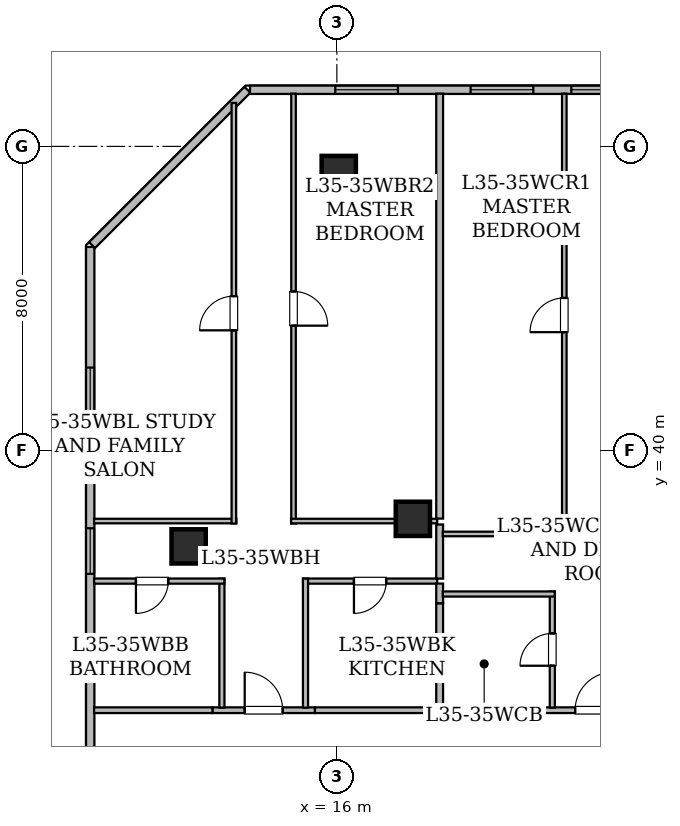
"""IFC4 building model, lengths in metres.
Left out: names, types, materials, properties, quantities, classifications, styles, units other than length and angle.
Written with IfcOpenShell. Run it as: python <this file> out.ifc"""

import sys

from ifc_helpers import new_model, si_unit, direction, frame, frame_2d, origin, origin_2d, place, context, subcontext, project, spatial, rectangle, hollow_rectangle, extrude, element, fill, save


model = new_model("IFC4")
c1 = context("Model", 3, precision=1e-05, world=origin(), true_north=direction((0.0, 1.0)))
c2 = subcontext(c1, "Body", "Model", "MODEL_VIEW")
j1 = project(units=[si_unit("LENGTHUNIT", "METRE"), si_unit("PLANEANGLEUNIT", "RADIAN")], contexts=[c1])
p1 = place(None, origin())
s1 = spatial("IfcSite", under=j1, at=p1, CompositionType="ELEMENT")
p2 = place(p1, origin())
s2 = spatial("IfcBuilding", under=s1, at=p2, CompositionType="ELEMENT")
p3 = place(p2, frame((0.0, 0.0, 138.4)))
s3 = spatial("IfcBuildingStorey", under=s2, at=p3, CompositionType="ELEMENT", Elevation=138.4)
for number, where, z_axis, x_axis in (
    (1, (16.05, 47.3, 0.0), (0.0, 0.0, 1.0), (1.0, 0.0, 0.0)),
    (2, (12.1, 37.475, 0.0), (0.0, 0.0, 1.0), (1.0, 0.0, 0.0)),
    (3, (18.0, 38.2, 0.0), (0.0, 0.0, 1.0), (1.0, 0.0, 0.0)),
):
    element("IfcColumn", number, at=place(p3, frame(where, z_axis=z_axis, x_axis=x_axis)), inside=s3, PredefinedType="COLUMN", context=c2, shape_type="SweptSolid", body=[
        extrude(hollow_rectangle(XDim=0.9, YDim=0.9, WallThickness=0.045, at=origin_2d()), origin(), (0.0, 0.0, 1.0), 3.65),
    ])
p4 = place(p3, frame((9.51, 31.293, 0.0), z_axis=(0.0, 0.0, 1.0), x_axis=(0.0, 1.0, 0.0)))
e4 = element("IfcWall", 4, at=p4, inside=s3, PredefinedType="STANDARD", context=c2, shape_type="SweptSolid", body=[
    extrude(rectangle(XDim=14.061, YDim=0.22, at=frame_2d((7.031, 0.0))), origin(), (0.0, 0.0, 1.0), 3.43),
])
p5 = place(p4, frame((5.459, 0.0, 0.8)))
e5 = element("IfcOpeningElement", 5, at=p5, cuts=e4, PredefinedType="OPENING", context=c2, shape_type="SweptSolid", body=[
    extrude(rectangle(XDim=1.2, YDim=1.5, at=frame_2d((0.6, 0.75))), frame((0.0, 0.12, 0.0), z_axis=(0.0, -1.0, 0.0), x_axis=(1.0, 0.0, 0.0)), (0.0, 0.0, 1.0), 0.24),
])
p6 = place(p4, frame((9.237, 0.0, 0.85)))
e6 = element("IfcOpeningElement", 6, at=p6, cuts=e4, PredefinedType="OPENING", context=c2, shape_type="SweptSolid", body=[
    extrude(rectangle(XDim=1.65, YDim=1.55, at=frame_2d((0.825, 0.775))), frame((0.0, 0.12, 0.0), z_axis=(0.0, -1.0, 0.0), x_axis=(1.0, 0.0, 0.0)), (0.0, 0.0, 1.0), 0.24),
])
p7 = place(p3, frame((9.558, 45.402, 0.0), z_axis=(0.0, 0.0, 1.0), x_axis=(0.707106781187, 0.707106781187, 0.0)))
e7 = element("IfcWall", 7, at=p7, inside=s3, PredefinedType="STANDARD", context=c2, shape_type="SweptSolid", body=[
    extrude(rectangle(XDim=5.781, YDim=0.22, at=frame_2d((2.891, 0.0))), origin(), (0.0, 0.0, 1.0), 3.43),
])
p8 = place(p3, frame((13.715, 49.49, 0.0), z_axis=(0.0, 0.0, 1.0), x_axis=(1.0, 0.0, 0.0)))
e8 = element("IfcWall", 8, at=p8, inside=s3, PredefinedType="STANDARD", context=c2, shape_type="SweptSolid", body=[
    extrude(rectangle(XDim=38.639, YDim=0.22, at=frame_2d((19.319, 0.0))), origin(), (0.0, 0.0, 1.0), 3.43),
])
p9 = place(p8, frame((2.243, 0.0, 0.85)))
e9 = element("IfcOpeningElement", 9, at=p9, cuts=e8, PredefinedType="OPENING", context=c2, shape_type="SweptSolid", body=[
    extrude(rectangle(XDim=1.65, YDim=1.55, at=frame_2d((0.825, 0.775))), frame((0.0, 0.12, 0.0), z_axis=(0.0, -1.0, 0.0), x_axis=(1.0, 0.0, 0.0)), (0.0, 0.0, 1.0), 0.24),
])
p10 = place(p8, frame((8.455, 0.0, 0.8)))
e10 = element("IfcOpeningElement", 10, at=p10, cuts=e8, PredefinedType="OPENING", context=c2, shape_type="SweptSolid", body=[
    extrude(rectangle(XDim=1.2, YDim=1.5, at=frame_2d((0.6, 0.75))), frame((0.0, 0.12, 0.0), z_axis=(0.0, -1.0, 0.0), x_axis=(1.0, 0.0, 0.0)), (0.0, 0.0, 1.0), 0.24),
])
p11 = place(p8, frame((5.805, 0.0, 0.85)))
e11 = element("IfcOpeningElement", 11, at=p11, cuts=e8, PredefinedType="OPENING", context=c2, shape_type="SweptSolid", body=[
    extrude(rectangle(XDim=1.65, YDim=1.55, at=frame_2d((0.825, 0.775))), frame((0.0, 0.12, 0.0), z_axis=(0.0, -1.0, 0.0), x_axis=(1.0, 0.0, 0.0)), (0.0, 0.0, 1.0), 0.24),
])
p12 = place(p8, frame((10.655, 0.0, 0.85)))
e12 = element("IfcOpeningElement", 12, at=p12, cuts=e8, PredefinedType="OPENING", context=c2, shape_type="SweptSolid", body=[
    extrude(rectangle(XDim=1.65, YDim=1.55, at=frame_2d((0.825, 0.775))), frame((0.0, 0.12, 0.0), z_axis=(0.0, -1.0, 0.0), x_axis=(1.0, 0.0, 0.0)), (0.0, 0.0, 1.0), 0.24),
])
p13 = place(p8, frame((16.851, 0.0, 0.85)))
e13 = element("IfcOpeningElement", 13, at=p13, cuts=e8, PredefinedType="OPENING", context=c2, shape_type="SweptSolid", body=[
    extrude(rectangle(XDim=1.65, YDim=1.55, at=frame_2d((0.825, 0.775))), frame((0.0, 0.12, 0.0), z_axis=(0.0, -1.0, 0.0), x_axis=(1.0, 0.0, 0.0)), (0.0, 0.0, 1.0), 0.24),
])
p14 = place(p8, frame((24.116, 0.0, 0.85)))
e14 = element("IfcOpeningElement", 14, at=p14, cuts=e8, PredefinedType="OPENING", context=c2, shape_type="SweptSolid", body=[
    extrude(rectangle(XDim=1.65, YDim=1.55, at=frame_2d((0.825, 0.775))), frame((0.0, 0.12, 0.0), z_axis=(0.0, -1.0, 0.0), x_axis=(1.0, 0.0, 0.0)), (0.0, 0.0, 1.0), 0.24),
])
p15 = place(p8, frame((30.23, 0.0, 0.85)))
e15 = element("IfcOpeningElement", 15, at=p15, cuts=e8, PredefinedType="OPENING", context=c2, shape_type="SweptSolid", body=[
    extrude(rectangle(XDim=1.65, YDim=1.55, at=frame_2d((0.825, 0.775))), frame((0.0, 0.12, 0.0), z_axis=(0.0, -1.0, 0.0), x_axis=(1.0, 0.0, 0.0)), (0.0, 0.0, 1.0), 0.24),
])
p16 = place(p8, frame((36.367, 0.0, 0.85)))
e16 = element("IfcOpeningElement", 16, at=p16, cuts=e8, PredefinedType="OPENING", context=c2, shape_type="SweptSolid", body=[
    extrude(rectangle(XDim=1.65, YDim=1.55, at=frame_2d((0.825, 0.775))), frame((0.0, 0.12, 0.0), z_axis=(0.0, -1.0, 0.0), x_axis=(1.0, 0.0, 0.0)), (0.0, 0.0, 1.0), 0.24),
])
p17 = place(p3, frame((12.726, 33.165, 0.0), z_axis=(0.0, 0.0, 1.0), x_axis=(1.0, 0.0, 0.0)))
e17 = element("IfcWall", 17, at=p17, inside=s3, PredefinedType="STANDARD", context=c2, shape_type="SweptSolid", body=[
    extrude(rectangle(XDim=2.698, YDim=0.15, at=frame_2d((1.349, 0.0))), origin(), (0.0, 0.0, 1.0), 3.43),
])
p18 = place(p17, frame((0.849, 0.0, 0.0)))
e18 = element("IfcOpeningElement", 18, at=p18, cuts=e17, PredefinedType="OPENING", context=c2, shape_type="SweptSolid", body=[
    extrude(rectangle(XDim=1.0, YDim=2.15, at=frame_2d((0.5, 1.075))), frame((0.0, 0.085, 0.0), z_axis=(0.0, -1.0, 0.0), x_axis=(1.0, 0.0, 0.0)), (0.0, 0.0, 1.0), 0.17),
])
p19 = place(p3, frame((9.612, 33.165, 0.0), z_axis=(0.0, 0.0, 1.0), x_axis=(1.0, 0.0, 0.0)))
e19 = element("IfcWall", 19, at=p19, inside=s3, PredefinedType="STANDARD", context=c2, shape_type="SweptSolid", body=[
    extrude(rectangle(XDim=3.114, YDim=0.15, at=frame_2d((1.557, 0.0))), origin(), (0.0, 0.0, 1.0), 2.876),
])
p20 = place(p3, frame((15.424, 33.165, 0.0), z_axis=(0.0, 0.0, 1.0), x_axis=(1.0, 0.0, 0.0)))
e20 = element("IfcWall", 20, at=p20, inside=s3, PredefinedType="STANDARD", context=c2, shape_type="SweptSolid", body=[
    extrude(rectangle(XDim=3.53, YDim=0.15, at=frame_2d((1.765, 0.0))), origin(), (0.0, 0.0, 1.0), 2.647),
])
p21 = place(p3, frame((21.421, 33.165, 0.0), z_axis=(0.0, 0.0, 1.0), x_axis=(1.0, 0.0, 0.0)))
e21 = element("IfcWall", 21, at=p21, inside=s3, PredefinedType="STANDARD", context=c2, shape_type="SweptSolid", body=[
    extrude(rectangle(XDim=2.698, YDim=0.15, at=frame_2d((1.349, 0.0))), origin(), (0.0, 0.0, 1.0), 3.43),
])
p22 = place(p21, frame((0.849, 0.0, 0.0)))
e22 = element("IfcOpeningElement", 22, at=p22, cuts=e21, PredefinedType="OPENING", context=c2, shape_type="SweptSolid", body=[
    extrude(rectangle(XDim=1.0, YDim=2.15, at=frame_2d((0.5, 1.075))), frame((0.0, 0.085, 0.0), z_axis=(0.0, -1.0, 0.0), x_axis=(1.0, 0.0, 0.0)), (0.0, 0.0, 1.0), 0.17),
])
p23 = place(p3, frame((18.954, 33.165, 0.0), z_axis=(0.0, 0.0, 1.0), x_axis=(1.0, 0.0, 0.0)))
e23 = element("IfcWall", 23, at=p23, inside=s3, PredefinedType="STANDARD", context=c2, shape_type="SweptSolid", body=[
    extrude(rectangle(XDim=2.467, YDim=0.15, at=frame_2d((1.233, 0.0))), origin(), (0.0, 0.0, 1.0), 3.43),
])
p24 = place(p3, frame((12.975, 33.232, 0.0), z_axis=(0.0, 0.0, 1.0), x_axis=(0.0, 1.0, 0.0)))
e24 = element("IfcWall", 24, at=p24, inside=s3, PredefinedType="PARTITIONING", context=c2, shape_type="SweptSolid", body=[
    extrude(rectangle(XDim=3.395, YDim=0.135, at=frame_2d((1.698, 0.0))), origin(), (0.0, 0.0, 1.0), 3.43),
])
p25 = place(p3, frame((13.04, 36.562, 0.0), z_axis=(0.0, 0.0, 1.0), x_axis=(-1.0, 0.0, 0.0)))
e25 = element("IfcWall", 25, at=p25, inside=s3, PredefinedType="PARTITIONING", context=c2, shape_type="SweptSolid", body=[
    extrude(rectangle(XDim=3.428, YDim=0.135, at=frame_2d((1.714, 0.0))), origin(), (0.0, 0.0, 1.0), 2.876),
])
p26 = place(p25, frame((1.477, 0.0, 0.0)))
e26 = element("IfcOpeningElement", 26, at=p26, cuts=e25, PredefinedType="OPENING", context=c2, shape_type="SweptSolid", body=[
    extrude(rectangle(XDim=0.85, YDim=2.1, at=frame_2d((0.425, 1.05))), frame((0.0, 0.077, 0.0), z_axis=(0.0, -1.0, 0.0), x_axis=(1.0, 0.0, 0.0)), (0.0, 0.0, 1.0), 0.155),
])
p27 = place(p3, frame((18.64, 36.562, 0.0), z_axis=(0.0, 0.0, 1.0), x_axis=(-1.0, 0.0, 0.0)))
e27 = element("IfcWall", 27, at=p27, inside=s3, PredefinedType="PARTITIONING", context=c2, shape_type="SweptSolid", body=[
    extrude(rectangle(XDim=3.53, YDim=0.135, at=frame_2d((1.765, 0.0))), origin(), (0.0, 0.0, 1.0), 2.647),
])
p28 = place(p27, frame((1.34, 0.0, 0.0)))
e28 = element("IfcOpeningElement", 28, at=p28, cuts=e27, PredefinedType="OPENING", context=c2, shape_type="SweptSolid", body=[
    extrude(rectangle(XDim=0.85, YDim=2.1, at=frame_2d((0.425, 1.05))), frame((0.0, 0.077, 0.0), z_axis=(0.0, -1.0, 0.0), x_axis=(1.0, 0.0, 0.0)), (0.0, 0.0, 1.0), 0.155),
])
p29 = place(p3, frame((15.175, 36.627, 0.0), z_axis=(0.0, 0.0, 1.0), x_axis=(0.0, -1.0, 0.0)))
e29 = element("IfcWall", 29, at=p29, inside=s3, PredefinedType="PARTITIONING", context=c2, shape_type="SweptSolid", body=[
    extrude(rectangle(XDim=3.395, YDim=0.135, at=frame_2d((1.698, 0.0))), origin(), (0.0, 0.0, 1.0), 3.43),
])
p30 = place(p3, frame((9.612, 38.142, 0.0), z_axis=(0.0, 0.0, 1.0), x_axis=(1.0, 0.0, 0.0)))
e30 = element("IfcWall", 30, at=p30, inside=s3, PredefinedType="PARTITIONING", context=c2, shape_type="SweptSolid", body=[
    extrude(rectangle(XDim=3.743, YDim=0.12, at=frame_2d((1.872, 0.0))), origin(), (0.0, 0.0, 1.0), 2.876),
])
p31 = place(p3, frame((13.29, 38.077, 0.0), z_axis=(0.0, 0.0, 1.0), x_axis=(0.0, 1.0, 0.0)))
e31 = element("IfcWall", 31, at=p31, inside=s3, PredefinedType="PARTITIONING", context=c2, shape_type="SweptSolid", body=[
    extrude(rectangle(XDim=11.066, YDim=0.12, at=frame_2d((5.533, 0.0))), origin(), (0.0, 0.0, 1.0), 2.876),
])
p32 = place(p31, frame((5.083, 0.0, 0.0)))
e32 = element("IfcOpeningElement", 32, at=p32, cuts=e31, PredefinedType="OPENING", context=c2, shape_type="SweptSolid", body=[
    extrude(rectangle(XDim=0.9, YDim=2.1, at=frame_2d((0.45, 1.05))), frame((0.0, 0.07, 0.0), z_axis=(0.0, -1.0, 0.0), x_axis=(1.0, 0.0, 0.0)), (0.0, 0.0, 1.0), 0.14),
])
p33 = place(p3, frame((14.86, 49.388, 0.0), z_axis=(0.0, 0.0, 1.0), x_axis=(0.0, -1.0, 0.0)))
e33 = element("IfcWall", 33, at=p33, inside=s3, PredefinedType="PARTITIONING", context=c2, shape_type="SweptSolid", body=[
    extrude(rectangle(XDim=11.311, YDim=0.12, at=frame_2d((5.656, 0.0))), origin(), (0.0, 0.0, 1.0), 2.876),
])
p34 = place(p33, frame((5.205, 0.0, 0.0)))
e34 = element("IfcOpeningElement", 34, at=p34, cuts=e33, PredefinedType="OPENING", context=c2, shape_type="SweptSolid", body=[
    extrude(rectangle(XDim=0.9, YDim=2.1, at=frame_2d((0.45, 1.05))), frame((0.0, 0.07, 0.0), z_axis=(0.0, -1.0, 0.0), x_axis=(1.0, 0.0, 0.0)), (0.0, 0.0, 1.0), 0.14),
])
p35 = place(p3, frame((14.795, 38.142, 0.0), z_axis=(0.0, 0.0, 1.0), x_axis=(1.0, 0.0, 0.0)))
e35 = element("IfcWall", 35, at=p35, inside=s3, PredefinedType="PARTITIONING", context=c2, shape_type="SweptSolid", body=[
    extrude(rectangle(XDim=3.845, YDim=0.12, at=frame_2d((1.922, 0.0))), origin(), (0.0, 0.0, 1.0), 2.647),
])
p36 = place(p3, frame((18.705, 38.051, 0.0), z_axis=(0.0, 0.0, 1.0), x_axis=(0.0, -1.0, 0.0)))
e36 = element("IfcWall", 36, at=p36, inside=s3, PredefinedType="STANDARD", context=c2, shape_type="SweptSolid", body=[
    extrude(rectangle(XDim=1.424, YDim=0.18, at=frame_2d((0.712, 0.0))), origin(), (0.0, 0.0, 1.0), 2.647),
])
p37 = place(p3, frame((18.705, 36.497, 0.0), z_axis=(0.0, 0.0, 1.0), x_axis=(0.0, -1.0, 0.0)))
e37 = element("IfcWall", 37, at=p37, inside=s3, PredefinedType="STANDARD", context=c2, shape_type="SweptSolid", body=[
    extrude(rectangle(XDim=0.524, YDim=0.18, at=frame_2d((0.262, 0.0))), origin(), (0.0, 0.0, 1.0), 3.43),
])
p38 = place(p3, frame((18.705, 35.973, 0.0), z_axis=(0.0, 0.0, 1.0), x_axis=(0.0, -1.0, 0.0)))
e38 = element("IfcWall", 38, at=p38, inside=s3, PredefinedType="STANDARD", context=c2, shape_type="SweptSolid", body=[
    extrude(rectangle(XDim=2.741, YDim=0.18, at=frame_2d((1.371, 0.0))), origin(), (0.0, 0.0, 1.0), 3.43),
])
p39 = place(p3, frame((18.705, 49.388, 0.0), z_axis=(0.0, 0.0, 1.0), x_axis=(0.0, -1.0, 0.0)))
e39 = element("IfcWall", 39, at=p39, inside=s3, PredefinedType="STANDARD", context=c2, shape_type="SweptSolid", body=[
    extrude(rectangle(XDim=11.181, YDim=0.18, at=frame_2d((5.59, 0.0))), origin(), (0.0, 0.0, 1.0), 2.647),
])
p40 = place(p3, frame((21.67, 33.232, 0.0), z_axis=(0.0, 0.0, 1.0), x_axis=(0.0, 1.0, 0.0)))
e40 = element("IfcWall", 40, at=p40, inside=s3, PredefinedType="PARTITIONING", context=c2, shape_type="SweptSolid", body=[
    extrude(rectangle(XDim=3.055, YDim=0.135, at=frame_2d((1.528, 0.0))), origin(), (0.0, 0.0, 1.0), 3.43),
])
p41 = place(p40, frame((1.103, 0.0, 0.0)))
e41 = element("IfcOpeningElement", 41, at=p41, cuts=e40, PredefinedType="OPENING", context=c2, shape_type="SweptSolid", body=[
    extrude(rectangle(XDim=0.85, YDim=2.1, at=frame_2d((0.425, 1.05))), frame((0.0, 0.077, 0.0), z_axis=(0.0, -1.0, 0.0), x_axis=(1.0, 0.0, 0.0)), (0.0, 0.0, 1.0), 0.155),
])
p42 = place(p3, frame((21.735, 36.222, 0.0), z_axis=(0.0, 0.0, 1.0), x_axis=(-1.0, 0.0, 0.0)))
e42 = element("IfcWall", 42, at=p42, inside=s3, PredefinedType="PARTITIONING", context=c2, shape_type="SweptSolid", body=[
    extrude(rectangle(XDim=2.948, YDim=0.135, at=frame_2d((1.474, 0.0))), origin(), (0.0, 0.0, 1.0), 3.43),
])
p43 = place(p3, frame((18.787, 37.802, 0.0), z_axis=(0.0, 0.0, 1.0), x_axis=(1.0, 0.0, 0.0)))
e43 = element("IfcWall", 43, at=p43, inside=s3, PredefinedType="PARTITIONING", context=c2, shape_type="SweptSolid", body=[
    extrude(rectangle(XDim=3.263, YDim=0.12, at=frame_2d((1.631, 0.0))), origin(), (0.0, 0.0, 1.0), 2.647),
])
p44 = place(p3, frame((21.985, 37.737, 0.0), z_axis=(0.0, 0.0, 1.0), x_axis=(0.0, 1.0, 0.0)))
e44 = element("IfcWall", 44, at=p44, inside=s3, PredefinedType="PARTITIONING", context=c2, shape_type="SweptSolid", body=[
    extrude(rectangle(XDim=11.651, YDim=0.12, at=frame_2d((5.825, 0.0))), origin(), (0.0, 0.0, 1.0), 2.647),
])
p45 = place(p44, frame((5.375, 0.0, 0.0)))
e45 = element("IfcOpeningElement", 45, at=p45, cuts=e44, PredefinedType="OPENING", context=c2, shape_type="SweptSolid", body=[
    extrude(rectangle(XDim=0.9, YDim=2.1, at=frame_2d((0.45, 1.05))), frame((0.0, 0.07, 0.0), z_axis=(0.0, -1.0, 0.0), x_axis=(1.0, 0.0, 0.0)), (0.0, 0.0, 1.0), 0.14),
])
p46 = place(p5, origin())
e46 = element("IfcWindow", 46, at=p46, inside=s3, PartitioningType="SINGLE_PANEL", PredefinedType="WINDOW", context=c2, shape_type="SweptSolid", body=[
    extrude(rectangle(XDim=1.2, YDim=1.5, at=frame_2d((0.6, 0.75))), frame((0.0, 0.03, 0.0), z_axis=(0.0, -1.0, 0.0), x_axis=(1.0, 0.0, 0.0)), (0.0, 0.0, 1.0), 0.06),
])
fill(e5, e46)
p47 = place(p6, origin())
e47 = element("IfcWindow", 47, at=p47, inside=s3, PartitioningType="SINGLE_PANEL", PredefinedType="WINDOW", context=c2, shape_type="SweptSolid", body=[
    extrude(rectangle(XDim=1.65, YDim=1.55, at=frame_2d((0.825, 0.775))), frame((0.0, 0.03, 0.0), z_axis=(0.0, -1.0, 0.0), x_axis=(1.0, 0.0, 0.0)), (0.0, 0.0, 1.0), 0.06),
])
fill(e6, e47)
p48 = place(p9, origin())
e48 = element("IfcWindow", 48, at=p48, inside=s3, PartitioningType="SINGLE_PANEL", PredefinedType="WINDOW", context=c2, shape_type="SweptSolid", body=[
    extrude(rectangle(XDim=1.65, YDim=1.55, at=frame_2d((0.825, 0.775))), frame((0.0, 0.03, 0.0), z_axis=(0.0, -1.0, 0.0), x_axis=(1.0, 0.0, 0.0)), (0.0, 0.0, 1.0), 0.06),
])
fill(e9, e48)
p49 = place(p10, origin())
e49 = element("IfcWindow", 49, at=p49, inside=s3, PartitioningType="SINGLE_PANEL", PredefinedType="WINDOW", context=c2, shape_type="SweptSolid", body=[
    extrude(rectangle(XDim=1.2, YDim=1.5, at=frame_2d((0.6, 0.75))), frame((0.0, 0.03, 0.0), z_axis=(0.0, -1.0, 0.0), x_axis=(1.0, 0.0, 0.0)), (0.0, 0.0, 1.0), 0.06),
])
fill(e10, e49)
p50 = place(p11, origin())
e50 = element("IfcWindow", 50, at=p50, inside=s3, PartitioningType="SINGLE_PANEL", PredefinedType="WINDOW", context=c2, shape_type="SweptSolid", body=[
    extrude(rectangle(XDim=1.65, YDim=1.55, at=frame_2d((0.825, 0.775))), frame((0.0, 0.03, 0.0), z_axis=(0.0, -1.0, 0.0), x_axis=(1.0, 0.0, 0.0)), (0.0, 0.0, 1.0), 0.06),
])
fill(e11, e50)
p51 = place(p18, origin())
e51 = element("IfcDoor", 51, at=p51, inside=s3, OperationType="SINGLE_SWING_LEFT", PredefinedType="DOOR", context=c2, shape_type="SweptSolid", body=[
    extrude(rectangle(XDim=1.0, YDim=2.15, at=frame_2d((0.5, 1.075))), frame((0.0, 0.025, 0.0), z_axis=(0.0, -1.0, 0.0), x_axis=(1.0, 0.0, 0.0)), (0.0, 0.0, 1.0), 0.05),
])
fill(e18, e51)
p52 = place(p22, origin())
e52 = element("IfcDoor", 52, at=p52, inside=s3, OperationType="SINGLE_SWING_RIGHT", PredefinedType="DOOR", context=c2, shape_type="SweptSolid", body=[
    extrude(rectangle(XDim=1.0, YDim=2.15, at=frame_2d((0.5, 1.075))), frame((0.0, 0.025, 0.0), z_axis=(0.0, -1.0, 0.0), x_axis=(1.0, 0.0, 0.0)), (0.0, 0.0, 1.0), 0.05),
])
fill(e22, e52)
p53 = place(p26, origin())
e53 = element("IfcDoor", 53, at=p53, inside=s3, OperationType="SINGLE_SWING_RIGHT", PredefinedType="DOOR", context=c2, shape_type="SweptSolid", body=[
    extrude(rectangle(XDim=0.85, YDim=2.1, at=frame_2d((0.425, 1.05))), frame((0.0, 0.025, 0.0), z_axis=(0.0, -1.0, 0.0), x_axis=(1.0, 0.0, 0.0)), (0.0, 0.0, 1.0), 0.05),
])
fill(e26, e53)
p54 = place(p28, origin())
e54 = element("IfcDoor", 54, at=p54, inside=s3, OperationType="SINGLE_SWING_RIGHT", PredefinedType="DOOR", context=c2, shape_type="SweptSolid", body=[
    extrude(rectangle(XDim=0.85, YDim=2.1, at=frame_2d((0.425, 1.05))), frame((0.0, 0.025, 0.0), z_axis=(0.0, -1.0, 0.0), x_axis=(1.0, 0.0, 0.0)), (0.0, 0.0, 1.0), 0.05),
])
fill(e28, e54)
p55 = place(p32, origin())
e55 = element("IfcDoor", 55, at=p55, inside=s3, OperationType="SINGLE_SWING_LEFT", PredefinedType="DOOR", context=c2, shape_type="SweptSolid", body=[
    extrude(rectangle(XDim=0.9, YDim=2.1, at=frame_2d((0.45, 1.05))), frame((0.0, 0.025, 0.0), z_axis=(0.0, -1.0, 0.0), x_axis=(1.0, 0.0, 0.0)), (0.0, 0.0, 1.0), 0.05),
])
fill(e32, e55)
p56 = place(p34, origin())
e56 = element("IfcDoor", 56, at=p56, inside=s3, OperationType="SINGLE_SWING_RIGHT", PredefinedType="DOOR", context=c2, shape_type="SweptSolid", body=[
    extrude(rectangle(XDim=0.9, YDim=2.1, at=frame_2d((0.45, 1.05))), frame((0.0, 0.025, 0.0), z_axis=(0.0, -1.0, 0.0), x_axis=(1.0, 0.0, 0.0)), (0.0, 0.0, 1.0), 0.05),
])
fill(e34, e56)
p57 = place(p41, origin())
e57 = element("IfcDoor", 57, at=p57, inside=s3, OperationType="SINGLE_SWING_LEFT", PredefinedType="DOOR", context=c2, shape_type="SweptSolid", body=[
    extrude(rectangle(XDim=0.85, YDim=2.1, at=frame_2d((0.425, 1.05))), frame((0.0, 0.025, 0.0), z_axis=(0.0, -1.0, 0.0), x_axis=(1.0, 0.0, 0.0)), (0.0, 0.0, 1.0), 0.05),
])
fill(e41, e57)
p58 = place(p45, origin())
e58 = element("IfcDoor", 58, at=p58, inside=s3, OperationType="SINGLE_SWING_LEFT", PredefinedType="DOOR", context=c2, shape_type="SweptSolid", body=[
    extrude(rectangle(XDim=0.9, YDim=2.1, at=frame_2d((0.45, 1.05))), frame((0.0, 0.025, 0.0), z_axis=(0.0, -1.0, 0.0), x_axis=(1.0, 0.0, 0.0)), (0.0, 0.0, 1.0), 0.05),
])
fill(e45, e58)
save(model, sys.argv[1])
